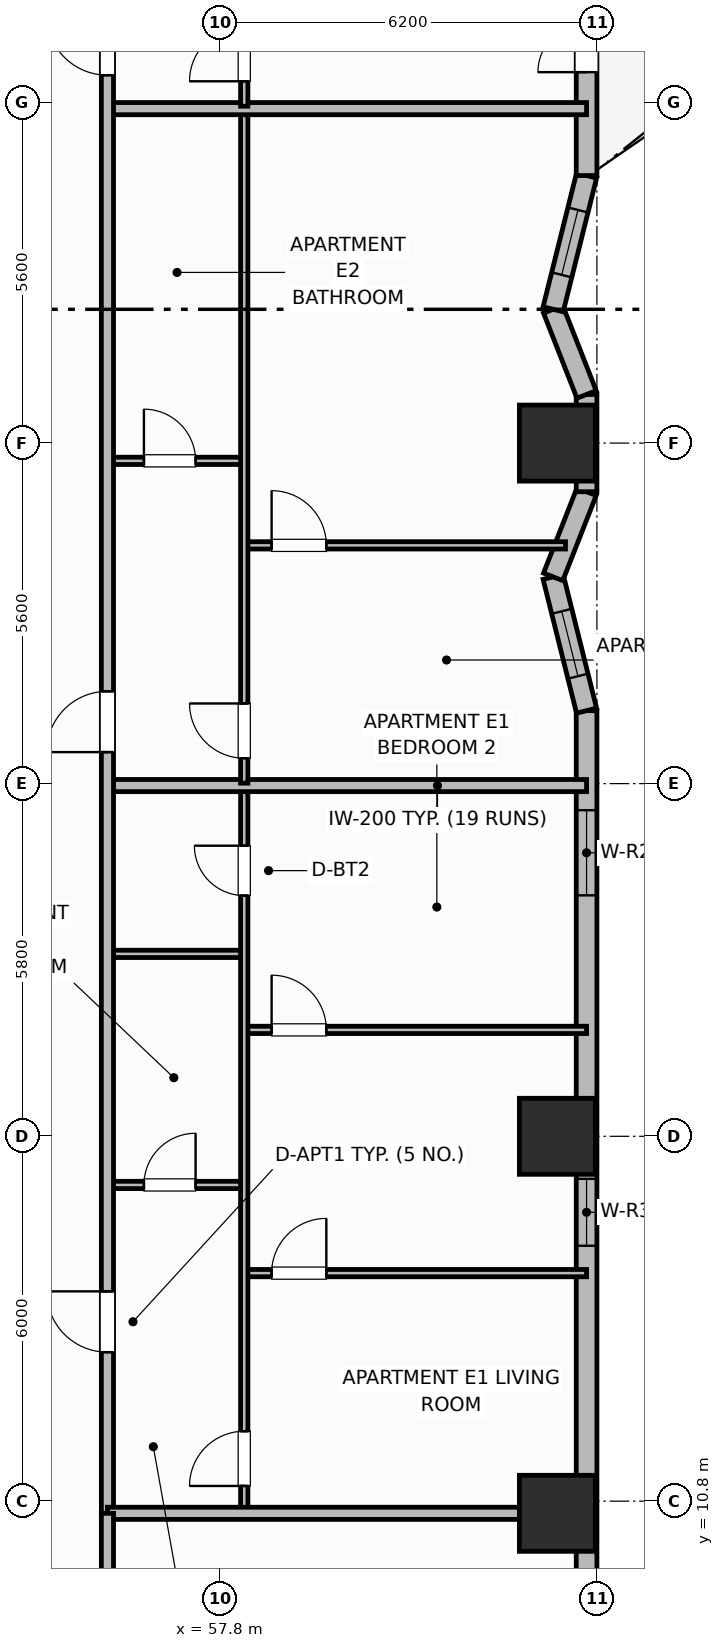
"""IFC4 building model, lengths in metres.
Left out: names, types, materials, properties, quantities, classifications, styles, units other than length and angle.
Written with IfcOpenShell. Run it as: python <this file> out.ifc"""

import sys

from ifc_helpers import new_model, si_unit, direction, frame, frame_2d, origin, origin_2d, place, context, subcontext, project, spatial, rectangle, extrude, element, fill, save


model = new_model("IFC4")
c1 = context("Model", 3, precision=1e-05, world=origin(), true_north=direction((0.0, 1.0)))
c2 = subcontext(c1, "Body", "Model", "MODEL_VIEW")
j1 = project(units=[si_unit("LENGTHUNIT", "METRE"), si_unit("PLANEANGLEUNIT", "RADIAN")], contexts=[c1])
p1 = place(None, origin())
s1 = spatial("IfcSite", under=j1, at=p1, CompositionType="ELEMENT")
p2 = place(p1, origin())
s2 = spatial("IfcBuilding", under=s1, at=p2, CompositionType="ELEMENT")
p3 = place(p2, frame((0.0, 0.0, 28.8)))
s3 = spatial("IfcBuildingStorey", under=s2, at=p3, CompositionType="ELEMENT", Elevation=28.8)
for number, where, z_axis, x_axis in (
    (1, (63.35, 10.6, 0.0), (0.0, 0.0, 1.0), (1.0, 0.0, 0.0)),
    (2, (63.35, 16.8, 0.0), (0.0, 0.0, 1.0), (1.0, 0.0, 0.0)),
    (3, (63.35, 28.2, 0.0), (0.0, 0.0, 1.0), (1.0, 0.0, 0.0)),
):
    element("IfcColumn", number, at=place(p3, frame(where, z_axis=z_axis, x_axis=x_axis)), inside=s3, PredefinedType="COLUMN", context=c2, shape_type="SweptSolid", body=[
        extrude(rectangle(XDim=1.25, YDim=1.25, at=origin_2d()), origin(), (0.0, 0.0, 1.0), 3.7),
    ])
p4 = place(p3, frame((63.83, 9.0, 0.0), z_axis=(0.0, 0.0, 1.0), x_axis=(0.0, 1.0, 0.0)))
e4 = element("IfcWall", 4, at=p4, inside=s3, PredefinedType="SOLIDWALL", context=c2, shape_type="SweptSolid", body=[
    extrude(rectangle(XDim=14.8, YDim=0.34, at=frame_2d((7.4, 0.0))), origin(), (0.0, 0.0, 1.0), 2.7),
])
p5 = place(p4, frame((6.0, 0.0, 0.89)))
e5 = element("IfcOpeningElement", 5, at=p5, cuts=e4, PredefinedType="OPENING", context=c2, shape_type="SweptSolid", body=[
    extrude(rectangle(XDim=1.1, YDim=1.65, at=frame_2d((0.55, 0.825))), frame((0.0, 0.18, 0.0), z_axis=(0.0, -1.0, 0.0), x_axis=(1.0, 0.0, 0.0)), (0.0, 0.0, 1.0), 0.36),
])
p6 = place(p4, frame((11.762, 0.0, 0.73)))
e6 = element("IfcOpeningElement", 6, at=p6, cuts=e4, PredefinedType="OPENING", context=c2, shape_type="SweptSolid", body=[
    extrude(rectangle(XDim=1.4, YDim=1.85, at=frame_2d((0.7, 0.925))), frame((0.0, 0.18, 0.0), z_axis=(0.0, -1.0, 0.0), x_axis=(1.0, 0.0, 0.0)), (0.0, 0.0, 1.0), 0.36),
])
p7 = place(p3, frame((63.83, 23.8, 0.0), z_axis=(0.0, 0.0, 1.0), x_axis=(-0.242560957029, 0.970136166796, 0.0)))
e7 = element("IfcWall", 7, at=p7, inside=s3, PredefinedType="SOLIDWALL", context=c2, shape_type="SweptSolid", body=[
    extrude(rectangle(XDim=2.268, YDim=0.34, at=frame_2d((1.134, 0.0))), origin(), (0.0, 0.0, 1.0), 2.7),
])
p8 = place(p7, frame((0.584, 0.0, 0.89)))
e8 = element("IfcOpeningElement", 8, at=p8, cuts=e7, PredefinedType="OPENING", context=c2, shape_type="SweptSolid", body=[
    extrude(rectangle(XDim=1.1, YDim=1.65, at=frame_2d((0.55, 0.825))), frame((0.0, 0.18, 0.0), z_axis=(0.0, -1.0, 0.0), x_axis=(1.0, 0.0, 0.0)), (0.0, 0.0, 1.0), 0.36),
])
p9 = place(p3, frame((63.28, 26.0, 0.0), z_axis=(0.0, 0.0, 1.0), x_axis=(0.365702591843, 0.930731762818, 0.0)))
e9 = element("IfcWall", 9, at=p9, inside=s3, PredefinedType="SOLIDWALL", context=c2, shape_type="SweptSolid", body=[
    extrude(rectangle(XDim=1.504, YDim=0.34, at=frame_2d((0.752, 0.0))), origin(), (0.0, 0.0, 1.0), 2.7),
])
p10 = place(p3, frame((63.83, 27.4, 0.0), z_axis=(0.0, 0.0, 1.0), x_axis=(0.0, 1.0, 0.0)))
e10 = element("IfcWall", 10, at=p10, inside=s3, PredefinedType="SOLIDWALL", context=c2, shape_type="SweptSolid", body=[
    extrude(rectangle(XDim=1.6, YDim=0.34, at=frame_2d((0.8, 0.0))), origin(), (0.0, 0.0, 1.0), 2.7),
])
p11 = place(p3, frame((63.83, 29.0, 0.0), z_axis=(0.0, 0.0, 1.0), x_axis=(-0.365702591843, 0.930731762818, 0.0)))
e11 = element("IfcWall", 11, at=p11, inside=s3, PredefinedType="SOLIDWALL", context=c2, shape_type="SweptSolid", body=[
    extrude(rectangle(XDim=1.504, YDim=0.34, at=frame_2d((0.752, 0.0))), origin(), (0.0, 0.0, 1.0), 2.7),
])
p12 = place(p3, frame((63.28, 30.4, 0.0), z_axis=(0.0, 0.0, 1.0), x_axis=(0.242535625036, 0.970142500145, 0.0)))
e12 = element("IfcWall", 12, at=p12, inside=s3, PredefinedType="SOLIDWALL", context=c2, shape_type="SweptSolid", body=[
    extrude(rectangle(XDim=2.268, YDim=0.34, at=frame_2d((1.134, 0.0))), origin(), (0.0, 0.0, 1.0), 2.7),
])
p13 = place(p12, frame((0.584, 0.0, 0.89)))
e13 = element("IfcOpeningElement", 13, at=p13, cuts=e12, PredefinedType="OPENING", context=c2, shape_type="SweptSolid", body=[
    extrude(rectangle(XDim=1.1, YDim=1.65, at=frame_2d((0.55, 0.825))), frame((0.0, 0.18, 0.0), z_axis=(0.0, -1.0, 0.0), x_axis=(1.0, 0.0, 0.0)), (0.0, 0.0, 1.0), 0.36),
])
p14 = place(p3, frame((63.83, 32.6, 0.0), z_axis=(0.0, 0.0, 1.0), x_axis=(0.0, 1.0, 0.0)))
e14 = element("IfcWall", 14, at=p14, inside=s3, PredefinedType="SOLIDWALL", context=c2, shape_type="SweptSolid", body=[
    extrude(rectangle(XDim=14.8, YDim=0.34, at=frame_2d((7.4, 0.0))), origin(), (0.0, 0.0, 1.0), 2.7),
])
p15 = place(p14, frame((1.7, 0.0, 0.0)))
e15 = element("IfcOpeningElement", 15, at=p15, cuts=e14, PredefinedType="OPENING", context=c2, shape_type="SweptSolid", body=[
    extrude(rectangle(XDim=1.6, YDim=2.1, at=frame_2d((0.8, 1.05))), frame((0.0, 0.18, 0.0), z_axis=(0.0, -1.0, 0.0), x_axis=(1.0, 0.0, 0.0)), (0.0, 0.0, 1.0), 0.36),
])
p16 = place(p14, frame((7.68, 0.0, 0.89)))
e16 = element("IfcOpeningElement", 16, at=p16, cuts=e14, PredefinedType="OPENING", context=c2, shape_type="SweptSolid", body=[
    extrude(rectangle(XDim=1.1, YDim=1.65, at=frame_2d((0.55, 0.825))), frame((0.0, 0.18, 0.0), z_axis=(0.0, -1.0, 0.0), x_axis=(1.0, 0.0, 0.0)), (0.0, 0.0, 1.0), 0.36),
])
p17 = place(p14, frame((9.9, 0.0, 0.93)))
e17 = element("IfcOpeningElement", 17, at=p17, cuts=e14, PredefinedType="OPENING", context=c2, shape_type="SweptSolid", body=[
    extrude(rectangle(XDim=1.1, YDim=1.65, at=frame_2d((0.55, 0.825))), frame((0.0, 0.18, 0.0), z_axis=(0.0, -1.0, 0.0), x_axis=(1.0, 0.0, 0.0)), (0.0, 0.0, 1.0), 0.36),
])
p18 = place(p3, frame((55.95, 16.0, 0.0), z_axis=(0.0, 0.0, 1.0), x_axis=(1.0, 0.0, 0.0)))
e18 = element("IfcWall", 18, at=p18, inside=s3, PredefinedType="PARTITIONING", context=c2, shape_type="SweptSolid", body=[
    extrude(rectangle(XDim=2.25, YDim=0.12, at=frame_2d((1.125, 0.0))), origin(), (0.0, 0.0, 1.0), 2.53),
])
p19 = place(p18, frame((0.6, 0.0, 0.0)))
e19 = element("IfcOpeningElement", 19, at=p19, cuts=e18, PredefinedType="OPENING", context=c2, shape_type="SweptSolid", body=[
    extrude(rectangle(XDim=0.85, YDim=2.1, at=frame_2d((0.425, 1.05))), frame((0.0, 0.07, 0.0), z_axis=(0.0, -1.0, 0.0), x_axis=(1.0, 0.0, 0.0)), (0.0, 0.0, 1.0), 0.14),
])
p20 = place(p3, frame((55.95, 19.8, 0.0), z_axis=(0.0, 0.0, 1.0), x_axis=(1.0, 0.0, 0.0)))
e20 = element("IfcWall", 20, at=p20, inside=s3, PredefinedType="PARTITIONING", context=c2, shape_type="SweptSolid", body=[
    extrude(rectangle(XDim=2.25, YDim=0.12, at=frame_2d((1.125, 0.0))), origin(), (0.0, 0.0, 1.0), 2.53),
])
p21 = place(p3, frame((58.2, 14.55, 0.0), z_axis=(0.0, 0.0, 1.0), x_axis=(1.0, 0.0, 0.0)))
e21 = element("IfcWall", 21, at=p21, inside=s3, PredefinedType="PARTITIONING", context=c2, shape_type="SweptSolid", body=[
    extrude(rectangle(XDim=5.63, YDim=0.12, at=frame_2d((2.815, 0.0))), origin(), (0.0, 0.0, 1.0), 2.53),
])
p22 = place(p21, frame((0.45, 0.0, 0.0)))
e22 = element("IfcOpeningElement", 22, at=p22, cuts=e21, PredefinedType="OPENING", context=c2, shape_type="SweptSolid", body=[
    extrude(rectangle(XDim=0.9, YDim=2.1, at=frame_2d((0.45, 1.05))), frame((0.0, 0.07, 0.0), z_axis=(0.0, -1.0, 0.0), x_axis=(1.0, 0.0, 0.0)), (0.0, 0.0, 1.0), 0.14),
])
p23 = place(p3, frame((58.2, 18.55, 0.0), z_axis=(0.0, 0.0, 1.0), x_axis=(1.0, 0.0, 0.0)))
e23 = element("IfcWall", 23, at=p23, inside=s3, PredefinedType="PARTITIONING", context=c2, shape_type="SweptSolid", body=[
    extrude(rectangle(XDim=5.63, YDim=0.12, at=frame_2d((2.815, 0.0))), origin(), (0.0, 0.0, 1.0), 2.53),
])
p24 = place(p23, frame((0.45, 0.0, 0.0)))
e24 = element("IfcOpeningElement", 24, at=p24, cuts=e23, PredefinedType="OPENING", context=c2, shape_type="SweptSolid", body=[
    extrude(rectangle(XDim=0.9, YDim=2.1, at=frame_2d((0.45, 1.05))), frame((0.0, 0.07, 0.0), z_axis=(0.0, -1.0, 0.0), x_axis=(1.0, 0.0, 0.0)), (0.0, 0.0, 1.0), 0.14),
])
p25 = place(p3, frame((58.2, 10.64, 0.0), z_axis=(0.0, 0.0, 1.0), x_axis=(0.0, 1.0, 0.0)))
e25 = element("IfcWall", 25, at=p25, inside=s3, PredefinedType="PARTITIONING", context=c2, shape_type="SweptSolid", body=[
    extrude(rectangle(XDim=11.888, YDim=0.12, at=frame_2d((5.944, 0.0))), origin(), (0.0, 0.0, 1.0), 2.53),
])
p26 = place(p25, frame((0.41, 0.0, 0.0)))
e26 = element("IfcOpeningElement", 26, at=p26, cuts=e25, PredefinedType="OPENING", context=c2, shape_type="SweptSolid", body=[
    extrude(rectangle(XDim=0.9, YDim=2.1, at=frame_2d((0.45, 1.05))), frame((0.0, 0.07, 0.0), z_axis=(0.0, -1.0, 0.0), x_axis=(1.0, 0.0, 0.0)), (0.0, 0.0, 1.0), 0.14),
])
p27 = place(p25, frame((10.119, 0.0, 0.0)))
e27 = element("IfcOpeningElement", 27, at=p27, cuts=e25, PredefinedType="OPENING", context=c2, shape_type="SweptSolid", body=[
    extrude(rectangle(XDim=0.82, YDim=2.08, at=frame_2d((0.41, 1.04))), frame((0.0, 0.07, 0.0), z_axis=(0.0, -1.0, 0.0), x_axis=(1.0, 0.0, 0.0)), (0.0, 0.0, 1.0), 0.14),
])
p28 = place(p3, frame((55.95, 22.568, 0.0), z_axis=(0.0, 0.0, 1.0), x_axis=(1.0, 0.0, 0.0)))
e28 = element("IfcWall", 28, at=p28, inside=s3, PredefinedType="PARTITIONING", context=c2, shape_type="SweptSolid", body=[
    extrude(rectangle(XDim=7.88, YDim=0.2, at=frame_2d((3.94, 0.0))), origin(), (0.0, 0.0, 1.0), 2.53),
])
p29 = place(p3, frame((55.95, 27.908, 0.0), z_axis=(0.0, 0.0, 1.0), x_axis=(1.0, 0.0, 0.0)))
e29 = element("IfcWall", 29, at=p29, inside=s3, PredefinedType="PARTITIONING", context=c2, shape_type="SweptSolid", body=[
    extrude(rectangle(XDim=2.25, YDim=0.12, at=frame_2d((1.125, 0.0))), origin(), (0.0, 0.0, 1.0), 2.53),
])
p30 = place(p29, frame((0.6, 0.0, 0.0)))
e30 = element("IfcOpeningElement", 30, at=p30, cuts=e29, PredefinedType="OPENING", context=c2, shape_type="SweptSolid", body=[
    extrude(rectangle(XDim=0.85, YDim=2.1, at=frame_2d((0.425, 1.05))), frame((0.0, 0.07, 0.0), z_axis=(0.0, -1.0, 0.0), x_axis=(1.0, 0.0, 0.0)), (0.0, 0.0, 1.0), 0.14),
])
p31 = place(p3, frame((58.2, 26.518, 0.0), z_axis=(0.0, 0.0, 1.0), x_axis=(1.0, 0.0, 0.0)))
e31 = element("IfcWall", 31, at=p31, inside=s3, PredefinedType="PARTITIONING", context=c2, shape_type="SweptSolid", body=[
    extrude(rectangle(XDim=5.283, YDim=0.12, at=frame_2d((2.642, 0.0))), origin(), (0.0, 0.0, 1.0), 2.53),
])
p32 = place(p31, frame((0.45, 0.0, 0.0)))
e32 = element("IfcOpeningElement", 32, at=p32, cuts=e31, PredefinedType="OPENING", context=c2, shape_type="SweptSolid", body=[
    extrude(rectangle(XDim=0.9, YDim=2.1, at=frame_2d((0.45, 1.05))), frame((0.0, 0.07, 0.0), z_axis=(0.0, -1.0, 0.0), x_axis=(1.0, 0.0, 0.0)), (0.0, 0.0, 1.0), 0.14),
])
p33 = place(p3, frame((58.2, 22.608, 0.0), z_axis=(0.0, 0.0, 1.0), x_axis=(0.0, 1.0, 0.0)))
e33 = element("IfcWall", 33, at=p33, inside=s3, PredefinedType="PARTITIONING", context=c2, shape_type="SweptSolid", body=[
    extrude(rectangle(XDim=11.052, YDim=0.12, at=frame_2d((5.526, 0.0))), origin(), (0.0, 0.0, 1.0), 2.53),
])
p34 = place(p33, frame((0.41, 0.0, 0.0)))
e34 = element("IfcOpeningElement", 34, at=p34, cuts=e33, PredefinedType="OPENING", context=c2, shape_type="SweptSolid", body=[
    extrude(rectangle(XDim=0.9, YDim=2.1, at=frame_2d((0.45, 1.05))), frame((0.0, 0.07, 0.0), z_axis=(0.0, -1.0, 0.0), x_axis=(1.0, 0.0, 0.0)), (0.0, 0.0, 1.0), 0.14),
])
p35 = place(p3, frame((55.95, 33.7, 0.0), z_axis=(0.0, 0.0, 1.0), x_axis=(1.0, 0.0, 0.0)))
e35 = element("IfcWall", 35, at=p35, inside=s3, PredefinedType="PARTITIONING", context=c2, shape_type="SweptSolid", body=[
    extrude(rectangle(XDim=7.88, YDim=0.2, at=frame_2d((3.94, 0.0))), origin(), (0.0, 0.0, 1.0), 2.53),
])
p36 = place(p3, frame((58.2, 33.74, 0.0), z_axis=(0.0, 0.0, 1.0), x_axis=(0.0, 1.0, 0.0)))
e36 = element("IfcWall", 36, at=p36, inside=s3, PredefinedType="PARTITIONING", context=c2, shape_type="SweptSolid", body=[
    extrude(rectangle(XDim=12.02, YDim=0.12, at=frame_2d((6.01, 0.0))), origin(), (0.0, 0.0, 1.0), 2.53),
])
p37 = place(p36, frame((0.41, 0.0, 0.0)))
e37 = element("IfcOpeningElement", 37, at=p37, cuts=e36, PredefinedType="OPENING", context=c2, shape_type="SweptSolid", body=[
    extrude(rectangle(XDim=0.9, YDim=2.1, at=frame_2d((0.45, 1.05))), frame((0.0, 0.07, 0.0), z_axis=(0.0, -1.0, 0.0), x_axis=(1.0, 0.0, 0.0)), (0.0, 0.0, 1.0), 0.14),
])
p38 = place(p36, frame((10.185, 0.0, 0.0)))
e38 = element("IfcOpeningElement", 38, at=p38, cuts=e36, PredefinedType="OPENING", context=c2, shape_type="SweptSolid", body=[
    extrude(rectangle(XDim=0.82, YDim=2.08, at=frame_2d((0.41, 1.04))), frame((0.0, 0.07, 0.0), z_axis=(0.0, -1.0, 0.0), x_axis=(1.0, 0.0, 0.0)), (0.0, 0.0, 1.0), 0.14),
])
p39 = place(p3, frame((55.95, 10.6, 0.0), z_axis=(0.0, 0.0, 1.0), x_axis=(0.0, 1.0, 0.0)))
e39 = element("IfcWall", 39, at=p39, inside=s3, PredefinedType="PARTITIONING", context=c2, shape_type="SweptSolid", body=[
    extrude(rectangle(XDim=35.2, YDim=0.2, at=frame_2d((17.6, 0.0))), origin(), (0.0, 0.0, 1.0), 2.53),
])
p40 = place(p39, frame((2.65, 0.0, 0.0)))
e40 = element("IfcOpeningElement", 40, at=p40, cuts=e39, PredefinedType="OPENING", context=c2, shape_type="SweptSolid", body=[
    extrude(rectangle(XDim=1.0, YDim=2.15, at=frame_2d((0.5, 1.075))), frame((0.0, 0.11, 0.0), z_axis=(0.0, -1.0, 0.0), x_axis=(1.0, 0.0, 0.0)), (0.0, 0.0, 1.0), 0.22),
])
p41 = place(p39, frame((12.518, 0.0, 0.0)))
e41 = element("IfcOpeningElement", 41, at=p41, cuts=e39, PredefinedType="OPENING", context=c2, shape_type="SweptSolid", body=[
    extrude(rectangle(XDim=1.0, YDim=2.15, at=frame_2d((0.5, 1.075))), frame((0.0, 0.11, 0.0), z_axis=(0.0, -1.0, 0.0), x_axis=(1.0, 0.0, 0.0)), (0.0, 0.0, 1.0), 0.22),
])
p42 = place(p39, frame((23.65, 0.0, 0.0)))
e42 = element("IfcOpeningElement", 42, at=p42, cuts=e39, PredefinedType="OPENING", context=c2, shape_type="SweptSolid", body=[
    extrude(rectangle(XDim=1.0, YDim=2.15, at=frame_2d((0.5, 1.075))), frame((0.0, 0.11, 0.0), z_axis=(0.0, -1.0, 0.0), x_axis=(1.0, 0.0, 0.0)), (0.0, 0.0, 1.0), 0.22),
])
p43 = place(p3, frame((55.95, 10.6, 0.0), z_axis=(0.0, 0.0, 1.0), x_axis=(1.0, 0.0, 0.0)))
e43 = element("IfcWall", 43, at=p43, inside=s3, PredefinedType="PARTITIONING", context=c2, shape_type="SweptSolid", body=[
    extrude(rectangle(XDim=7.46, YDim=0.2, at=frame_2d((3.73, 0.0))), origin(), (0.0, 0.0, 1.0), 2.53),
])
p44 = place(p3, frame((55.95, 4.97, 0.0), z_axis=(0.0, 0.0, 1.0), x_axis=(0.0, 1.0, 0.0)))
e44 = element("IfcWall", 44, at=p44, inside=s3, PredefinedType="PARTITIONING", context=c2, shape_type="SweptSolid", body=[
    extrude(rectangle(XDim=5.63, YDim=0.2, at=frame_2d((2.815, 0.0))), origin(), (0.0, 0.0, 1.0), 2.53),
])
p45 = place(p5, origin())
e45 = element("IfcWindow", 45, at=p45, inside=s3, PartitioningType="SINGLE_PANEL", PredefinedType="WINDOW", context=c2, shape_type="SweptSolid", body=[
    extrude(rectangle(XDim=1.1, YDim=1.65, at=frame_2d((0.55, 0.825))), frame((0.0, 0.03, 0.0), z_axis=(0.0, -1.0, 0.0), x_axis=(1.0, 0.0, 0.0)), (0.0, 0.0, 1.0), 0.06),
])
fill(e5, e45)
p46 = place(p6, origin())
e46 = element("IfcWindow", 46, at=p46, inside=s3, PartitioningType="SINGLE_PANEL", PredefinedType="WINDOW", context=c2, shape_type="SweptSolid", body=[
    extrude(rectangle(XDim=1.4, YDim=1.85, at=frame_2d((0.7, 0.925))), frame((0.0, 0.03, 0.0), z_axis=(0.0, -1.0, 0.0), x_axis=(1.0, 0.0, 0.0)), (0.0, 0.0, 1.0), 0.06),
])
fill(e6, e46)
p47 = place(p8, origin())
e47 = element("IfcWindow", 47, at=p47, inside=s3, PartitioningType="SINGLE_PANEL", PredefinedType="WINDOW", context=c2, shape_type="SweptSolid", body=[
    extrude(rectangle(XDim=1.1, YDim=1.65, at=frame_2d((0.55, 0.825))), frame((0.0, 0.03, 0.0), z_axis=(0.0, -1.0, 0.0), x_axis=(1.0, 0.0, 0.0)), (0.0, 0.0, 1.0), 0.06),
])
fill(e8, e47)
p48 = place(p13, origin())
e48 = element("IfcWindow", 48, at=p48, inside=s3, PartitioningType="SINGLE_PANEL", PredefinedType="WINDOW", context=c2, shape_type="SweptSolid", body=[
    extrude(rectangle(XDim=1.1, YDim=1.65, at=frame_2d((0.55, 0.825))), frame((0.0, 0.03, 0.0), z_axis=(0.0, -1.0, 0.0), x_axis=(1.0, 0.0, 0.0)), (0.0, 0.0, 1.0), 0.06),
])
fill(e13, e48)
p49 = place(p15, origin())
e49 = element("IfcDoor", 49, at=p49, inside=s3, OperationType="DOUBLE_DOOR_SINGLE_SWING", PredefinedType="DOOR", context=c2, shape_type="SweptSolid", body=[
    extrude(rectangle(XDim=1.6, YDim=2.1, at=frame_2d((0.8, 1.05))), frame((0.0, 0.025, 0.0), z_axis=(0.0, -1.0, 0.0), x_axis=(1.0, 0.0, 0.0)), (0.0, 0.0, 1.0), 0.05),
])
fill(e15, e49)
p50 = place(p19, origin())
e50 = element("IfcDoor", 50, at=p50, inside=s3, OperationType="SINGLE_SWING_RIGHT", PredefinedType="DOOR", context=c2, shape_type="SweptSolid", body=[
    extrude(rectangle(XDim=0.85, YDim=2.1, at=frame_2d((0.425, 1.05))), frame((0.0, 0.025, 0.0), z_axis=(0.0, -1.0, 0.0), x_axis=(1.0, 0.0, 0.0)), (0.0, 0.0, 1.0), 0.05),
])
fill(e19, e50)
p51 = place(p22, origin())
e51 = element("IfcDoor", 51, at=p51, inside=s3, OperationType="SINGLE_SWING_RIGHT", PredefinedType="DOOR", context=c2, shape_type="SweptSolid", body=[
    extrude(rectangle(XDim=0.9, YDim=2.1, at=frame_2d((0.45, 1.05))), frame((0.0, 0.025, 0.0), z_axis=(0.0, -1.0, 0.0), x_axis=(1.0, 0.0, 0.0)), (0.0, 0.0, 1.0), 0.05),
])
fill(e22, e51)
p52 = place(p24, origin())
e52 = element("IfcDoor", 52, at=p52, inside=s3, OperationType="SINGLE_SWING_LEFT", PredefinedType="DOOR", context=c2, shape_type="SweptSolid", body=[
    extrude(rectangle(XDim=0.9, YDim=2.1, at=frame_2d((0.45, 1.05))), frame((0.0, 0.025, 0.0), z_axis=(0.0, -1.0, 0.0), x_axis=(1.0, 0.0, 0.0)), (0.0, 0.0, 1.0), 0.05),
])
fill(e24, e52)
p53 = place(p26, origin())
e53 = element("IfcDoor", 53, at=p53, inside=s3, OperationType="SINGLE_SWING_LEFT", PredefinedType="DOOR", context=c2, shape_type="SweptSolid", body=[
    extrude(rectangle(XDim=0.9, YDim=2.1, at=frame_2d((0.45, 1.05))), frame((0.0, 0.025, 0.0), z_axis=(0.0, -1.0, 0.0), x_axis=(1.0, 0.0, 0.0)), (0.0, 0.0, 1.0), 0.05),
])
fill(e26, e53)
p54 = place(p27, origin())
e54 = element("IfcDoor", 54, at=p54, inside=s3, OperationType="SINGLE_SWING_RIGHT", PredefinedType="DOOR", context=c2, shape_type="SweptSolid", body=[
    extrude(rectangle(XDim=0.82, YDim=2.08, at=frame_2d((0.41, 1.04))), frame((0.0, 0.025, 0.0), z_axis=(0.0, -1.0, 0.0), x_axis=(1.0, 0.0, 0.0)), (0.0, 0.0, 1.0), 0.05),
])
fill(e27, e54)
p55 = place(p30, origin())
e55 = element("IfcDoor", 55, at=p55, inside=s3, OperationType="SINGLE_SWING_LEFT", PredefinedType="DOOR", context=c2, shape_type="SweptSolid", body=[
    extrude(rectangle(XDim=0.85, YDim=2.1, at=frame_2d((0.425, 1.05))), frame((0.0, 0.025, 0.0), z_axis=(0.0, -1.0, 0.0), x_axis=(1.0, 0.0, 0.0)), (0.0, 0.0, 1.0), 0.05),
])
fill(e30, e55)
p56 = place(p32, origin())
e56 = element("IfcDoor", 56, at=p56, inside=s3, OperationType="SINGLE_SWING_LEFT", PredefinedType="DOOR", context=c2, shape_type="SweptSolid", body=[
    extrude(rectangle(XDim=0.9, YDim=2.1, at=frame_2d((0.45, 1.05))), frame((0.0, 0.025, 0.0), z_axis=(0.0, -1.0, 0.0), x_axis=(1.0, 0.0, 0.0)), (0.0, 0.0, 1.0), 0.05),
])
fill(e32, e56)
p57 = place(p34, origin())
e57 = element("IfcDoor", 57, at=p57, inside=s3, OperationType="SINGLE_SWING_RIGHT", PredefinedType="DOOR", context=c2, shape_type="SweptSolid", body=[
    extrude(rectangle(XDim=0.9, YDim=2.1, at=frame_2d((0.45, 1.05))), frame((0.0, 0.025, 0.0), z_axis=(0.0, -1.0, 0.0), x_axis=(1.0, 0.0, 0.0)), (0.0, 0.0, 1.0), 0.05),
])
fill(e34, e57)
p58 = place(p37, origin())
e58 = element("IfcDoor", 58, at=p58, inside=s3, OperationType="SINGLE_SWING_LEFT", PredefinedType="DOOR", context=c2, shape_type="SweptSolid", body=[
    extrude(rectangle(XDim=0.9, YDim=2.1, at=frame_2d((0.45, 1.05))), frame((0.0, 0.025, 0.0), z_axis=(0.0, -1.0, 0.0), x_axis=(1.0, 0.0, 0.0)), (0.0, 0.0, 1.0), 0.05),
])
fill(e37, e58)
p59 = place(p40, origin())
e59 = element("IfcDoor", 59, at=p59, inside=s3, OperationType="SINGLE_SWING_RIGHT", PredefinedType="DOOR", context=c2, shape_type="SweptSolid", body=[
    extrude(rectangle(XDim=1.0, YDim=2.15, at=frame_2d((0.5, 1.075))), frame((0.0, 0.025, 0.0), z_axis=(0.0, -1.0, 0.0), x_axis=(1.0, 0.0, 0.0)), (0.0, 0.0, 1.0), 0.05),
])
fill(e40, e59)
p60 = place(p41, origin())
e60 = element("IfcDoor", 60, at=p60, inside=s3, OperationType="SINGLE_SWING_LEFT", PredefinedType="DOOR", context=c2, shape_type="SweptSolid", body=[
    extrude(rectangle(XDim=1.0, YDim=2.15, at=frame_2d((0.5, 1.075))), frame((0.0, 0.025, 0.0), z_axis=(0.0, -1.0, 0.0), x_axis=(1.0, 0.0, 0.0)), (0.0, 0.0, 1.0), 0.05),
])
fill(e41, e60)
p61 = place(p42, origin())
e61 = element("IfcDoor", 61, at=p61, inside=s3, OperationType="SINGLE_SWING_RIGHT", PredefinedType="DOOR", context=c2, shape_type="SweptSolid", body=[
    extrude(rectangle(XDim=1.0, YDim=2.15, at=frame_2d((0.5, 1.075))), frame((0.0, 0.025, 0.0), z_axis=(0.0, -1.0, 0.0), x_axis=(1.0, 0.0, 0.0)), (0.0, 0.0, 1.0), 0.05),
])
fill(e42, e61)
save(model, sys.argv[1])
